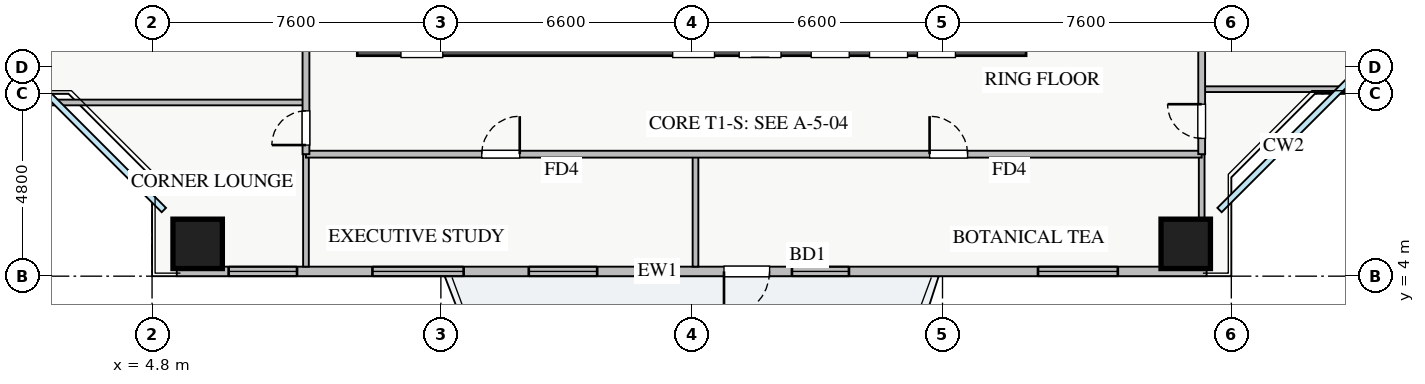
"""IFC4 building model, lengths in metres.
Left out: names, types, materials, properties, quantities, classifications, styles, units other than length and angle.
Written with IfcOpenShell. Run it as: python <this file> out.ifc"""

import sys

from ifc_helpers import new_model, si_unit, direction, frame, frame_2d, origin, origin_2d, place, context, subcontext, project, spatial, rectangle, extrude, source, transform, mapped, element, fill, save


model = new_model("IFC4")
c1 = context("Model", 3, precision=1e-05, world=origin(), true_north=direction((0.0, 1.0)))
c2 = subcontext(c1, "Body", "Model", "MODEL_VIEW")
j1 = project(units=[si_unit("LENGTHUNIT", "METRE"), si_unit("PLANEANGLEUNIT", "RADIAN")], contexts=[c1])
p1 = place(None, origin())
s1 = spatial("IfcSite", under=j1, at=p1, CompositionType="ELEMENT")
p2 = place(p1, origin())
s2 = spatial("IfcBuilding", under=s1, at=p2, CompositionType="ELEMENT")
p3 = place(p2, frame((0.0, 0.0, 36.0)))
s3 = spatial("IfcBuildingStorey", under=s2, at=p3, CompositionType="ELEMENT", Elevation=36.0)
p4 = place(p3, frame((10.2, 10.2, 0.0), z_axis=(0.0, 0.0, 1.0), x_axis=(1.0, 0.0, 0.0)))
e1 = element("IfcWall", 1, at=p4, inside=s3, PredefinedType="SHEAR", context=c2, shape_type="SweptSolid", body=[
    extrude(rectangle(XDim=17.6, YDim=0.8, at=frame_2d((8.8, 0.0))), origin(), (0.0, 0.0, 1.0), 3.25),
])
p5 = place(p4, frame((1.15, 0.0, 0.0)))
e2 = element("IfcOpeningElement", 2, at=p5, cuts=e1, PredefinedType="OPENING", context=c2, shape_type="SweptSolid", body=[
    extrude(rectangle(XDim=1.1, YDim=2.05, at=frame_2d((0.55, 1.025))), frame((0.0, 0.41, 0.0), z_axis=(0.0, -1.0, 0.0), x_axis=(1.0, 0.0, 0.0)), (0.0, 0.0, 1.0), 0.82),
])
p6 = place(p4, frame((8.3, 0.0, 0.0)))
e3 = element("IfcOpeningElement", 3, at=p6, cuts=e1, PredefinedType="OPENING", context=c2, shape_type="SweptSolid", body=[
    extrude(rectangle(XDim=1.1, YDim=2.05, at=frame_2d((0.55, 1.025))), frame((0.0, 0.41, 0.0), z_axis=(0.0, -1.0, 0.0), x_axis=(1.0, 0.0, 0.0)), (0.0, 0.0, 1.0), 0.82),
])
p7 = place(p4, frame((10.05, 0.0, 0.0)))
e4 = element("IfcOpeningElement", 4, at=p7, cuts=e1, PredefinedType="OPENING", context=c2, shape_type="SweptSolid", body=[
    extrude(rectangle(XDim=1.1, YDim=2.05, at=frame_2d((0.55, 1.025))), frame((0.0, 0.41, 0.0), z_axis=(0.0, -1.0, 0.0), x_axis=(1.0, 0.0, 0.0)), (0.0, 0.0, 1.0), 0.82),
])
p8 = place(p4, frame((14.74, 0.0, 0.0)))
e5 = element("IfcOpeningElement", 5, at=p8, cuts=e1, PredefinedType="OPENING", context=c2, shape_type="SweptSolid", body=[
    extrude(rectangle(XDim=1.0, YDim=2.05, at=frame_2d((0.5, 1.025))), frame((0.0, 0.41, 0.0), z_axis=(0.0, -1.0, 0.0), x_axis=(1.0, 0.0, 0.0)), (0.0, 0.0, 1.0), 0.82),
])
p9 = place(p4, frame((11.945, 0.0, 0.0)))
e6 = element("IfcOpeningElement", 6, at=p9, cuts=e1, PredefinedType="OPENING", context=c2, shape_type="SweptSolid", body=[
    extrude(rectangle(XDim=1.0, YDim=2.05, at=frame_2d((0.5, 1.025))), frame((0.0, 0.41, 0.0), z_axis=(0.0, -1.0, 0.0), x_axis=(1.0, 0.0, 0.0)), (0.0, 0.0, 1.0), 0.82),
])
p10 = place(p4, frame((13.48, 0.0, 0.0)))
e7 = element("IfcOpeningElement", 7, at=p10, cuts=e1, PredefinedType="OPENING", context=c2, shape_type="SweptSolid", body=[
    extrude(rectangle(XDim=1.0, YDim=2.05, at=frame_2d((0.5, 1.025))), frame((0.0, 0.41, 0.0), z_axis=(0.0, -1.0, 0.0), x_axis=(1.0, 0.0, 0.0)), (0.0, 0.0, 1.0), 0.82),
])
m1 = source(origin(), c2, "Body", "SweptSolid", [
    extrude(rectangle(XDim=1.3, YDim=1.3, at=origin_2d()), origin(), (0.0, 0.0, 1.0), 3.25),
])
for number, where, z_axis, x_axis in (
    (8, (6.0, 4.85, 0.0), (0.0, 0.0, 1.0), (1.0, 0.0, 0.0)),
    (9, (32.0, 4.85, 0.0), (0.0, 0.0, 1.0), (1.0, 0.0, 0.0)),
):
    element("IfcColumn", number, at=place(p3, frame(where, z_axis=z_axis, x_axis=x_axis)), inside=s3, PredefinedType="COLUMN", context=c2, shape_type="MappedRepresentation", body=[
        mapped(m1, transform((0.0, 0.0, 0.0), x_axis=(1.0, 0.0, 0.0), y_axis=(0.0, 1.0, 0.0), z_axis=(0.0, 0.0, 1.0), scale=1.0)),
    ])
p11 = place(p3, frame((5.45, 4.125, 0.0), z_axis=(0.0, 0.0, 1.0), x_axis=(1.0, 0.0, 0.0)))
e10 = element("IfcWall", 10, at=p11, inside=s3, PredefinedType="STANDARD", context=c2, shape_type="SweptSolid", body=[
    extrude(rectangle(XDim=27.1, YDim=0.25, at=frame_2d((13.55, 0.0))), origin(), (0.0, 0.0, 1.0), 2.61),
])
p12 = place(p11, frame((14.4, 0.0, 0.0)))
e11 = element("IfcOpeningElement", 11, at=p12, cuts=e10, PredefinedType="OPENING", context=c2, shape_type="SweptSolid", body=[
    extrude(rectangle(XDim=1.2, YDim=2.1, at=frame_2d((0.6, 1.05))), frame((0.0, 0.135, 0.0), z_axis=(0.0, -1.0, 0.0), x_axis=(1.0, 0.0, 0.0)), (0.0, 0.0, 1.0), 0.27),
])
p13 = place(p11, frame((1.365, 0.0, 0.9)))
e12 = element("IfcOpeningElement", 12, at=p13, cuts=e10, PredefinedType="OPENING", context=c2, shape_type="SweptSolid", body=[
    extrude(rectangle(XDim=1.8, YDim=1.5, at=frame_2d((0.9, 0.75))), frame((0.0, 0.135, 0.0), z_axis=(0.0, -1.0, 0.0), x_axis=(1.0, 0.0, 0.0)), (0.0, 0.0, 1.0), 0.27),
])
p14 = place(p11, frame((9.263, 0.0, 0.9)))
e13 = element("IfcOpeningElement", 13, at=p14, cuts=e10, PredefinedType="OPENING", context=c2, shape_type="SweptSolid", body=[
    extrude(rectangle(XDim=1.8, YDim=1.45, at=frame_2d((0.9, 0.725))), frame((0.0, 0.135, 0.0), z_axis=(0.0, -1.0, 0.0), x_axis=(1.0, 0.0, 0.0)), (0.0, 0.0, 1.0), 0.27),
])
p15 = place(p11, frame((16.188, 0.0, 0.9)))
e14 = element("IfcOpeningElement", 14, at=p15, cuts=e10, PredefinedType="OPENING", context=c2, shape_type="SweptSolid", body=[
    extrude(rectangle(XDim=1.5, YDim=1.45, at=frame_2d((0.75, 0.725))), frame((0.0, 0.135, 0.0), z_axis=(0.0, -1.0, 0.0), x_axis=(1.0, 0.0, 0.0)), (0.0, 0.0, 1.0), 0.27),
])
p16 = place(p11, frame((22.663, 0.0, 0.9)))
e15 = element("IfcOpeningElement", 15, at=p16, cuts=e10, PredefinedType="OPENING", context=c2, shape_type="SweptSolid", body=[
    extrude(rectangle(XDim=2.1, YDim=1.48, at=frame_2d((1.05, 0.74))), frame((0.0, 0.135, 0.0), z_axis=(0.0, -1.0, 0.0), x_axis=(1.0, 0.0, 0.0)), (0.0, 0.0, 1.0), 0.27),
])
p17 = place(p11, frame((5.149, 0.0, 0.9)))
e16 = element("IfcOpeningElement", 16, at=p17, cuts=e10, PredefinedType="OPENING", context=c2, shape_type="SweptSolid", body=[
    extrude(rectangle(XDim=2.4, YDim=1.5, at=frame_2d((1.2, 0.75))), frame((0.0, 0.135, 0.0), z_axis=(0.0, -1.0, 0.0), x_axis=(1.0, 0.0, 0.0)), (0.0, 0.0, 1.0), 0.27),
])
p18 = place(p3, frame((19.1, 4.25, 0.0), z_axis=(0.0, 0.0, 1.0), x_axis=(0.0, 1.0, 0.0)))
e17 = element("IfcWall", 17, at=p18, inside=s3, PredefinedType="PARTITIONING", context=c2, shape_type="SweptSolid", body=[
    extrude(rectangle(XDim=2.96, YDim=0.15, at=frame_2d((1.48, 0.0))), origin(), (0.0, 0.0, 1.0), 2.815),
])
for number, where, z_axis, x_axis in (
    (18, (8.85, 4.25, 0.0), (0.0, 0.0, 1.0), (0.0, 1.0, 0.0)),
    (19, (32.42, 4.25, 0.0), (0.0, 0.0, 1.0), (0.0, 1.0, 0.0)),
):
    element("IfcWall", number, at=place(p3, frame(where, z_axis=z_axis, x_axis=x_axis)), inside=s3, PredefinedType="PARTITIONING", context=c2, shape_type="SweptSolid", body=[
        extrude(rectangle(XDim=2.96, YDim=0.15, at=frame_2d((1.48, 0.0))), origin(), (0.0, 0.0, 1.0), 3.07),
    ])
p19 = place(p3, frame((8.85, 7.21, 0.0), z_axis=(0.0, 0.0, 1.0), x_axis=(1.0, 0.0, 0.0)))
e20 = element("IfcWall", 20, at=p19, inside=s3, PredefinedType="PARTITIONING", context=c2, shape_type="SweptSolid", body=[
    extrude(rectangle(XDim=23.57, YDim=0.18, at=frame_2d((11.785, 0.0))), origin(), (0.0, 0.0, 1.0), 3.07),
])
p20 = place(p19, frame((4.625, 0.0, 0.0)))
e21 = element("IfcOpeningElement", 21, at=p20, cuts=e20, PredefinedType="OPENING", context=c2, shape_type="SweptSolid", body=[
    extrude(rectangle(XDim=1.0, YDim=2.05, at=frame_2d((0.5, 1.025))), frame((0.0, 0.1, 0.0), z_axis=(0.0, -1.0, 0.0), x_axis=(1.0, 0.0, 0.0)), (0.0, 0.0, 1.0), 0.2),
])
p21 = place(p19, frame((16.41, 0.0, 0.0)))
e22 = element("IfcOpeningElement", 22, at=p21, cuts=e20, PredefinedType="OPENING", context=c2, shape_type="SweptSolid", body=[
    extrude(rectangle(XDim=1.0, YDim=2.05, at=frame_2d((0.5, 1.025))), frame((0.0, 0.1, 0.0), z_axis=(0.0, -1.0, 0.0), x_axis=(1.0, 0.0, 0.0)), (0.0, 0.0, 1.0), 0.2),
])
p22 = place(p3, frame((0.25, 8.57, 0.0), z_axis=(0.0, 0.0, 1.0), x_axis=(1.0, 0.0, 0.0)))
e23 = element("IfcWall", 23, at=p22, inside=s3, PredefinedType="PARTITIONING", context=c2, shape_type="SweptSolid", body=[
    extrude(rectangle(XDim=8.6, YDim=0.15, at=frame_2d((4.3, 0.0))), origin(), (0.0, 0.0, 1.0), 3.07),
])
p23 = place(p3, frame((8.85, 7.21, 0.0), z_axis=(0.0, 0.0, 1.0), x_axis=(0.0, 1.0, 0.0)))
e24 = element("IfcWall", 24, at=p23, inside=s3, PredefinedType="PARTITIONING", context=c2, shape_type="SweptSolid", body=[
    extrude(rectangle(XDim=31.23, YDim=0.18, at=frame_2d((15.615, 0.0))), origin(), (0.0, 0.0, 1.0), 3.07),
])
p24 = place(p23, frame((30.09, 0.0, 0.0)))
e25 = element("IfcOpeningElement", 25, at=p24, cuts=e24, PredefinedType="OPENING", context=c2, shape_type="SweptSolid", body=[
    extrude(rectangle(XDim=0.9, YDim=2.05, at=frame_2d((0.45, 1.025))), frame((0.0, 0.1, 0.0), z_axis=(0.0, -1.0, 0.0), x_axis=(1.0, 0.0, 0.0)), (0.0, 0.0, 1.0), 0.2),
])
p25 = place(p23, frame((0.24, 0.0, 0.0)))
e26 = element("IfcOpeningElement", 26, at=p25, cuts=e24, PredefinedType="OPENING", context=c2, shape_type="SweptSolid", body=[
    extrude(rectangle(XDim=0.9, YDim=2.05, at=frame_2d((0.45, 1.025))), frame((0.0, 0.1, 0.0), z_axis=(0.0, -1.0, 0.0), x_axis=(1.0, 0.0, 0.0)), (0.0, 0.0, 1.0), 0.2),
])
p26 = place(p23, frame((3.06, 0.0, 0.0)))
e27 = element("IfcOpeningElement", 27, at=p26, cuts=e24, PredefinedType="OPENING", context=c2, shape_type="SweptSolid", body=[
    extrude(rectangle(XDim=1.0, YDim=2.05, at=frame_2d((0.5, 1.025))), frame((0.0, 0.1, 0.0), z_axis=(0.0, -1.0, 0.0), x_axis=(1.0, 0.0, 0.0)), (0.0, 0.0, 1.0), 0.2),
])
p27 = place(p23, frame((12.795, 0.0, 0.0)))
e28 = element("IfcOpeningElement", 28, at=p27, cuts=e24, PredefinedType="OPENING", context=c2, shape_type="SweptSolid", body=[
    extrude(rectangle(XDim=1.0, YDim=2.05, at=frame_2d((0.5, 1.025))), frame((0.0, 0.1, 0.0), z_axis=(0.0, -1.0, 0.0), x_axis=(1.0, 0.0, 0.0)), (0.0, 0.0, 1.0), 0.2),
])
p28 = place(p23, frame((24.62, 0.0, 0.0)))
e29 = element("IfcOpeningElement", 29, at=p28, cuts=e24, PredefinedType="OPENING", context=c2, shape_type="SweptSolid", body=[
    extrude(rectangle(XDim=1.0, YDim=2.05, at=frame_2d((0.5, 1.025))), frame((0.0, 0.1, 0.0), z_axis=(0.0, -1.0, 0.0), x_axis=(1.0, 0.0, 0.0)), (0.0, 0.0, 1.0), 0.2),
])
p29 = place(p3, frame((32.42, 8.92, 0.0), z_axis=(0.0, 0.0, 1.0), x_axis=(1.0, 0.0, 0.0)))
e30 = element("IfcWall", 30, at=p29, inside=s3, PredefinedType="PARTITIONING", context=c2, shape_type="SweptSolid", body=[
    extrude(rectangle(XDim=5.33, YDim=0.15, at=frame_2d((2.665, 0.0))), origin(), (0.0, 0.0, 1.0), 3.07),
])
p30 = place(p3, frame((32.42, 7.21, 0.0), z_axis=(0.0, 0.0, 1.0), x_axis=(0.0, 1.0, 0.0)))
e31 = element("IfcWall", 31, at=p30, inside=s3, PredefinedType="PARTITIONING", context=c2, shape_type="SweptSolid", body=[
    extrude(rectangle(XDim=31.23, YDim=0.18, at=frame_2d((15.615, 0.0))), origin(), (0.0, 0.0, 1.0), 2.815),
])
p31 = place(p30, frame((30.09, 0.0, 0.0)))
e32 = element("IfcOpeningElement", 32, at=p31, cuts=e31, PredefinedType="OPENING", context=c2, shape_type="SweptSolid", body=[
    extrude(rectangle(XDim=0.9, YDim=2.05, at=frame_2d((0.45, 1.025))), frame((0.0, 0.1, 0.0), z_axis=(0.0, -1.0, 0.0), x_axis=(1.0, 0.0, 0.0)), (0.0, 0.0, 1.0), 0.2),
])
p32 = place(p30, frame((0.415, 0.0, 0.0)))
e33 = element("IfcOpeningElement", 33, at=p32, cuts=e31, PredefinedType="OPENING", context=c2, shape_type="SweptSolid", body=[
    extrude(rectangle(XDim=0.9, YDim=2.05, at=frame_2d((0.45, 1.025))), frame((0.0, 0.1, 0.0), z_axis=(0.0, -1.0, 0.0), x_axis=(1.0, 0.0, 0.0)), (0.0, 0.0, 1.0), 0.2),
])
p33 = place(p30, frame((3.465, 0.0, 0.0)))
e34 = element("IfcOpeningElement", 34, at=p33, cuts=e31, PredefinedType="OPENING", context=c2, shape_type="SweptSolid", body=[
    extrude(rectangle(XDim=1.0, YDim=2.05, at=frame_2d((0.5, 1.025))), frame((0.0, 0.1, 0.0), z_axis=(0.0, -1.0, 0.0), x_axis=(1.0, 0.0, 0.0)), (0.0, 0.0, 1.0), 0.2),
])
p34 = place(p30, frame((12.635, 0.0, 0.0)))
e35 = element("IfcOpeningElement", 35, at=p34, cuts=e31, PredefinedType="OPENING", context=c2, shape_type="SweptSolid", body=[
    extrude(rectangle(XDim=1.0, YDim=2.05, at=frame_2d((0.5, 1.025))), frame((0.0, 0.1, 0.0), z_axis=(0.0, -1.0, 0.0), x_axis=(1.0, 0.0, 0.0)), (0.0, 0.0, 1.0), 0.2),
])
p35 = place(p30, frame((22.5, 0.0, 0.0)))
e36 = element("IfcOpeningElement", 36, at=p35, cuts=e31, PredefinedType="OPENING", context=c2, shape_type="SweptSolid", body=[
    extrude(rectangle(XDim=1.0, YDim=2.05, at=frame_2d((0.5, 1.025))), frame((0.0, 0.1, 0.0), z_axis=(0.0, -1.0, 0.0), x_axis=(1.0, 0.0, 0.0)), (0.0, 0.0, 1.0), 0.2),
])
m2 = source(origin(), c2, "Body", "SweptSolid", [
    extrude(rectangle(XDim=1.2, YDim=2.1, at=frame_2d((0.6, 1.05))), frame((0.0, 0.025, 0.0), z_axis=(0.0, -1.0, 0.0), x_axis=(1.0, 0.0, 0.0)), (0.0, 0.0, 1.0), 0.05),
])
p36 = place(p12, frame((1.2, 0.0, 0.0), z_axis=(0.0, 0.0, 1.0), x_axis=(-1.0, 0.0, 0.0)))
e37 = element("IfcDoor", 37, at=p36, inside=s3, OperationType="SINGLE_SWING_LEFT", PredefinedType="DOOR", context=c2, shape_type="MappedRepresentation", body=[
    mapped(m2, transform((0.0, 0.0, 0.0), x_axis=(1.0, 0.0, 0.0), y_axis=(0.0, 1.0, 0.0), z_axis=(0.0, 0.0, 1.0), scale=1.0)),
])
fill(e11, e37)
m3 = source(origin(), c2, "Body", "SweptSolid", [
    extrude(rectangle(XDim=1.8, YDim=1.5, at=frame_2d((0.9, 0.75))), frame((0.0, 0.03, 0.0), z_axis=(0.0, -1.0, 0.0), x_axis=(1.0, 0.0, 0.0)), (0.0, 0.0, 1.0), 0.06),
])
p37 = place(p13, origin())
e38 = element("IfcWindow", 38, at=p37, inside=s3, PartitioningType="TRIPLE_PANEL_VERTICAL", PredefinedType="WINDOW", context=c2, shape_type="MappedRepresentation", body=[
    mapped(m3, transform((0.0, 0.0, 0.0), x_axis=(1.0, 0.0, 0.0), y_axis=(0.0, 1.0, 0.0), z_axis=(0.0, 0.0, 1.0), scale=1.0)),
])
fill(e12, e38)
m4 = source(origin(), c2, "Body", "SweptSolid", [
    extrude(rectangle(XDim=1.8, YDim=1.45, at=frame_2d((0.9, 0.725))), frame((0.0, 0.03, 0.0), z_axis=(0.0, -1.0, 0.0), x_axis=(1.0, 0.0, 0.0)), (0.0, 0.0, 1.0), 0.06),
])
p38 = place(p14, origin())
e39 = element("IfcWindow", 39, at=p38, inside=s3, PartitioningType="DOUBLE_PANEL_VERTICAL", PredefinedType="WINDOW", context=c2, shape_type="MappedRepresentation", body=[
    mapped(m4, transform((0.0, 0.0, 0.0), x_axis=(1.0, 0.0, 0.0), y_axis=(0.0, 1.0, 0.0), z_axis=(0.0, 0.0, 1.0), scale=1.0)),
])
fill(e13, e39)
m5 = source(origin(), c2, "Body", "SweptSolid", [
    extrude(rectangle(XDim=1.5, YDim=1.45, at=frame_2d((0.75, 0.725))), frame((0.0, 0.03, 0.0), z_axis=(0.0, -1.0, 0.0), x_axis=(1.0, 0.0, 0.0)), (0.0, 0.0, 1.0), 0.06),
])
p39 = place(p15, origin())
e40 = element("IfcWindow", 40, at=p39, inside=s3, PartitioningType="DOUBLE_PANEL_VERTICAL", PredefinedType="WINDOW", context=c2, shape_type="MappedRepresentation", body=[
    mapped(m5, transform((0.0, 0.0, 0.0), x_axis=(1.0, 0.0, 0.0), y_axis=(0.0, 1.0, 0.0), z_axis=(0.0, 0.0, 1.0), scale=1.0)),
])
fill(e14, e40)
m6 = source(origin(), c2, "Body", "SweptSolid", [
    extrude(rectangle(XDim=2.1, YDim=1.48, at=frame_2d((1.05, 0.74))), frame((0.0, 0.03, 0.0), z_axis=(0.0, -1.0, 0.0), x_axis=(1.0, 0.0, 0.0)), (0.0, 0.0, 1.0), 0.06),
])
p40 = place(p16, origin())
e41 = element("IfcWindow", 41, at=p40, inside=s3, PartitioningType="TRIPLE_PANEL_VERTICAL", PredefinedType="WINDOW", context=c2, shape_type="MappedRepresentation", body=[
    mapped(m6, transform((0.0, 0.0, 0.0), x_axis=(1.0, 0.0, 0.0), y_axis=(0.0, 1.0, 0.0), z_axis=(0.0, 0.0, 1.0), scale=1.0)),
])
fill(e15, e41)
m7 = source(origin(), c2, "Body", "SweptSolid", [
    extrude(rectangle(XDim=1.0, YDim=2.05, at=frame_2d((0.5, 1.025))), frame((0.0, 0.025, 0.0), z_axis=(0.0, -1.0, 0.0), x_axis=(1.0, 0.0, 0.0)), (0.0, 0.0, 1.0), 0.05),
])
p41 = place(p20, origin())
e42 = element("IfcDoor", 42, at=p41, inside=s3, OperationType="SINGLE_SWING_RIGHT", PredefinedType="DOOR", context=c2, shape_type="MappedRepresentation", body=[
    mapped(m7, transform((0.0, 0.0, 0.0), x_axis=(1.0, 0.0, 0.0), y_axis=(0.0, 1.0, 0.0), z_axis=(0.0, 0.0, 1.0), scale=1.0)),
])
fill(e21, e42)
p42 = place(p21, origin())
e43 = element("IfcDoor", 43, at=p42, inside=s3, OperationType="SINGLE_SWING_LEFT", PredefinedType="DOOR", context=c2, shape_type="MappedRepresentation", body=[
    mapped(m7, transform((0.0, 0.0, 0.0), x_axis=(1.0, 0.0, 0.0), y_axis=(0.0, 1.0, 0.0), z_axis=(0.0, 0.0, 1.0), scale=1.0)),
])
fill(e22, e43)
m8 = source(origin(), c2, "Body", "SweptSolid", [
    extrude(rectangle(XDim=0.9, YDim=2.05, at=frame_2d((0.45, 1.025))), frame((0.0, 0.025, 0.0), z_axis=(0.0, -1.0, 0.0), x_axis=(1.0, 0.0, 0.0)), (0.0, 0.0, 1.0), 0.05),
])
p43 = place(p25, origin())
e44 = element("IfcDoor", 44, at=p43, inside=s3, OperationType="SINGLE_SWING_LEFT", PredefinedType="DOOR", context=c2, shape_type="MappedRepresentation", body=[
    mapped(m8, transform((0.0, 0.0, 0.0), x_axis=(1.0, 0.0, 0.0), y_axis=(0.0, 1.0, 0.0), z_axis=(0.0, 0.0, 1.0), scale=1.0)),
])
fill(e26, e44)
p44 = place(p32, origin())
e45 = element("IfcDoor", 45, at=p44, inside=s3, OperationType="SINGLE_SWING_RIGHT", PredefinedType="DOOR", context=c2, shape_type="MappedRepresentation", body=[
    mapped(m8, transform((0.0, 0.0, 0.0), x_axis=(1.0, 0.0, 0.0), y_axis=(0.0, 1.0, 0.0), z_axis=(0.0, 0.0, 1.0), scale=1.0)),
])
fill(e33, e45)
m9 = source(origin(), c2, "Body", "SweptSolid", [
    extrude(rectangle(XDim=2.4, YDim=1.5, at=frame_2d((1.2, 0.75))), frame((0.0, 0.03, 0.0), z_axis=(0.0, -1.0, 0.0), x_axis=(1.0, 0.0, 0.0)), (0.0, 0.0, 1.0), 0.06),
])
p45 = place(p17, origin())
e46 = element("IfcWindow", 46, at=p45, inside=s3, PartitioningType="TRIPLE_PANEL_VERTICAL", PredefinedType="WINDOW", context=c2, shape_type="MappedRepresentation", body=[
    mapped(m9, transform((0.0, 0.0, 0.0), x_axis=(1.0, 0.0, 0.0), y_axis=(0.0, 1.0, 0.0), z_axis=(0.0, 0.0, 1.0), scale=1.0)),
])
fill(e16, e46)
save(model, sys.argv[1])
